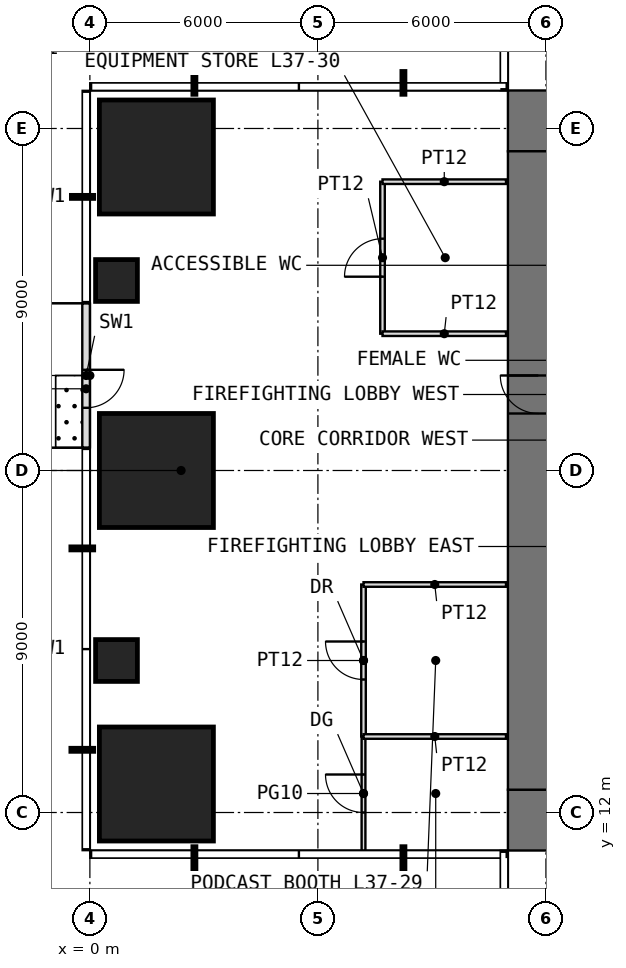
"""IFC4 building model, lengths in metres.
Left out: names, types, materials, properties, quantities, classifications, styles, units other than length and angle.
Written with IfcOpenShell. Run it as: python <this file> out.ifc"""

import sys

from ifc_helpers import new_model, si_unit, direction, frame, frame_2d, origin, origin_2d, place, context, subcontext, project, spatial, rectangle, extrude, element, fill, save


model = new_model("IFC4")
c1 = context("Model", 3, precision=1e-05, world=origin(), true_north=direction((0.0, 1.0)))
c2 = subcontext(c1, "Body", "Model", "MODEL_VIEW")
j1 = project(units=[si_unit("LENGTHUNIT", "METRE"), si_unit("PLANEANGLEUNIT", "RADIAN")], contexts=[c1])
p1 = place(None, origin())
s1 = spatial("IfcSite", under=j1, at=p1, CompositionType="ELEMENT")
p2 = place(p1, origin())
s2 = spatial("IfcBuilding", under=s1, at=p2, CompositionType="ELEMENT")
p3 = place(p2, frame((0.0, 0.0, 156.5)))
s3 = spatial("IfcBuildingStorey", under=s2, at=p3, CompositionType="ELEMENT", Elevation=156.5)
p4 = place(p3, frame((1.75, 12.75, 0.0), z_axis=(0.0, 0.0, 1.0), x_axis=(1.0, 0.0, 0.0)))
e1 = element("IfcColumn", 1, at=p4, inside=s3, PredefinedType="COLUMN", context=c2, shape_type="SweptSolid", body=[
    extrude(rectangle(XDim=3.0, YDim=3.0, at=origin_2d()), origin(), (0.0, 0.0, 1.0), 4.0),
])
p5 = place(p3, frame((0.7, 16.0, 0.0), z_axis=(0.0, 0.0, 1.0), x_axis=(1.0, 0.0, 0.0)))
e2 = element("IfcColumn", 2, at=p5, inside=s3, PredefinedType="COLUMN", context=c2, shape_type="SweptSolid", body=[
    extrude(rectangle(XDim=1.1, YDim=1.1, at=origin_2d()), origin(), (0.0, 0.0, 1.0), 4.0),
])
p6 = place(p3, frame((1.75, 21.0, 0.0), z_axis=(0.0, 0.0, 1.0), x_axis=(1.0, 0.0, 0.0)))
e3 = element("IfcColumn", 3, at=p6, inside=s3, PredefinedType="COLUMN", context=c2, shape_type="SweptSolid", body=[
    extrude(rectangle(XDim=3.0, YDim=3.0, at=origin_2d()), origin(), (0.0, 0.0, 1.0), 4.0),
])
p7 = place(p3, frame((0.7, 26.0, 0.0), z_axis=(0.0, 0.0, 1.0), x_axis=(1.0, 0.0, 0.0)))
e4 = element("IfcColumn", 4, at=p7, inside=s3, PredefinedType="COLUMN", context=c2, shape_type="SweptSolid", body=[
    extrude(rectangle(XDim=1.1, YDim=1.1, at=origin_2d()), origin(), (0.0, 0.0, 1.0), 4.0),
])
p8 = place(p3, frame((1.75, 29.25, 0.0), z_axis=(0.0, 0.0, 1.0), x_axis=(1.0, 0.0, 0.0)))
e5 = element("IfcColumn", 5, at=p8, inside=s3, PredefinedType="COLUMN", context=c2, shape_type="SweptSolid", body=[
    extrude(rectangle(XDim=3.0, YDim=3.0, at=origin_2d()), origin(), (0.0, 0.0, 1.0), 4.0),
])
p9 = place(p3, frame((-0.1, 25.4, 0.0), z_axis=(0.0, 0.0, 1.0), x_axis=(0.0, -1.0, 0.0)))
e6 = element("IfcWall", 6, at=p9, inside=s3, PredefinedType="USERDEFINED", context=c2, shape_type="SweptSolid", body=[
    extrude(rectangle(XDim=3.8, YDim=0.2, at=frame_2d((1.9, 0.0))), origin(), (0.0, 0.0, 1.0), 3.55),
])
p10 = place(p9, frame((1.75, 0.0, 0.0)))
e7 = element("IfcOpeningElement", 7, at=p10, cuts=e6, PredefinedType="OPENING", context=c2, shape_type="SweptSolid", body=[
    extrude(rectangle(XDim=1.0, YDim=2.4, at=frame_2d((0.5, 1.2))), frame((0.0, 0.11, 0.0), z_axis=(0.0, -1.0, 0.0), x_axis=(1.0, 0.0, 0.0)), (0.0, 0.0, 1.0), 0.22),
])
p11 = place(p3, frame((11.0, 11.8, -0.05), z_axis=(0.0, 0.0, 1.0), x_axis=(1.0, 0.0, 0.0)))
e8 = element("IfcWall", 8, at=p11, inside=s3, PredefinedType="SHEAR", context=c2, shape_type="SweptSolid", body=[
    extrude(rectangle(XDim=20.0, YDim=1.6, at=frame_2d((10.0, 0.0))), origin(), (0.0, 0.0, 1.0), 3.8),
])
p12 = place(p11, frame((9.0, 0.0, 0.05)))
e9 = element("IfcOpeningElement", 9, at=p12, cuts=e8, PredefinedType="OPENING", context=c2, shape_type="SweptSolid", body=[
    extrude(rectangle(XDim=2.0, YDim=2.2, at=frame_2d((1.0, 1.1))), frame((0.0, 0.81, 0.0), z_axis=(0.0, -1.0, 0.0), x_axis=(1.0, 0.0, 0.0)), (0.0, 0.0, 1.0), 1.62),
])
p13 = place(p3, frame((11.0, 30.2, -0.05), z_axis=(0.0, 0.0, 1.0), x_axis=(1.0, 0.0, 0.0)))
e10 = element("IfcWall", 10, at=p13, inside=s3, PredefinedType="SHEAR", context=c2, shape_type="SweptSolid", body=[
    extrude(rectangle(XDim=20.0, YDim=1.6, at=frame_2d((10.0, 0.0))), origin(), (0.0, 0.0, 1.0), 3.8),
])
p14 = place(p13, frame((9.0, 0.0, 0.05)))
e11 = element("IfcOpeningElement", 11, at=p14, cuts=e10, PredefinedType="OPENING", context=c2, shape_type="SweptSolid", body=[
    extrude(rectangle(XDim=2.0, YDim=2.2, at=frame_2d((1.0, 1.1))), frame((0.0, 0.81, 0.0), z_axis=(0.0, -1.0, 0.0), x_axis=(1.0, 0.0, 0.0)), (0.0, 0.0, 1.0), 1.62),
])
p15 = place(p3, frame((11.8, 12.6, -0.05), z_axis=(0.0, 0.0, 1.0), x_axis=(0.0, 1.0, 0.0)))
e12 = element("IfcWall", 12, at=p15, inside=s3, PredefinedType="SHEAR", context=c2, shape_type="SweptSolid", body=[
    extrude(rectangle(XDim=16.8, YDim=1.6, at=frame_2d((8.4, 0.0))), origin(), (0.0, 0.0, 1.0), 3.8),
])
p16 = place(p15, frame((9.9, 0.0, 0.05)))
e13 = element("IfcOpeningElement", 13, at=p16, cuts=e12, PredefinedType="OPENING", context=c2, shape_type="SweptSolid", body=[
    extrude(rectangle(XDim=1.0, YDim=2.2, at=frame_2d((0.5, 1.1))), frame((0.0, 0.81, 0.0), z_axis=(0.0, -1.0, 0.0), x_axis=(1.0, 0.0, 0.0)), (0.0, 0.0, 1.0), 1.62),
])
p17 = place(p3, frame((7.2, 11.0, 0.0), z_axis=(0.0, 0.0, 1.0), x_axis=(0.0, 1.0, 0.0)))
e14 = element("IfcWall", 14, at=p17, inside=s3, PredefinedType="PARTITIONING", context=c2, shape_type="SweptSolid", body=[
    extrude(rectangle(XDim=3.0, YDim=0.1, at=frame_2d((1.5, 0.0))), origin(), (0.0, 0.0, 1.0), 3.55),
])
p18 = place(p17, frame((1.0, 0.0, 0.0)))
e15 = element("IfcOpeningElement", 15, at=p18, cuts=e14, PredefinedType="OPENING", context=c2, shape_type="SweptSolid", body=[
    extrude(rectangle(XDim=1.0, YDim=2.4, at=frame_2d((0.5, 1.2))), frame((0.0, 0.06, 0.0), z_axis=(0.0, -1.0, 0.0), x_axis=(1.0, 0.0, 0.0)), (0.0, 0.0, 1.0), 0.12),
])
p19 = place(p3, frame((7.2, 14.0, 0.0), z_axis=(0.0, 0.0, 1.0), x_axis=(0.0, 1.0, 0.0)))
e16 = element("IfcWall", 16, at=p19, inside=s3, PredefinedType="PARTITIONING", context=c2, shape_type="SweptSolid", body=[
    extrude(rectangle(XDim=4.0, YDim=0.12, at=frame_2d((2.0, 0.0))), origin(), (0.0, 0.0, 1.0), 3.55),
])
p20 = place(p19, frame((1.5, 0.0, 0.0)))
e17 = element("IfcOpeningElement", 17, at=p20, cuts=e16, PredefinedType="OPENING", context=c2, shape_type="SweptSolid", body=[
    extrude(rectangle(XDim=1.0, YDim=2.2, at=frame_2d((0.5, 1.1))), frame((0.0, 0.07, 0.0), z_axis=(0.0, -1.0, 0.0), x_axis=(1.0, 0.0, 0.0)), (0.0, 0.0, 1.0), 0.14),
])
for number, where, z_axis, x_axis in (
    (18, (7.2, 14.0, 0.0), (0.0, 0.0, 1.0), (1.0, 0.0, 0.0)),
    (19, (7.2, 18.0, 0.0), (0.0, 0.0, 1.0), (1.0, 0.0, 0.0)),
):
    element("IfcWall", number, at=place(p3, frame(where, z_axis=z_axis, x_axis=x_axis)), inside=s3, PredefinedType="PARTITIONING", context=c2, shape_type="SweptSolid", body=[
        extrude(rectangle(XDim=3.75, YDim=0.12, at=frame_2d((1.875, 0.0))), origin(), (0.0, 0.0, 1.0), 3.55),
    ])
p21 = place(p3, frame((7.7, 24.6, 0.0), z_axis=(0.0, 0.0, 1.0), x_axis=(0.0, 1.0, 0.0)))
e20 = element("IfcWall", 20, at=p21, inside=s3, PredefinedType="PARTITIONING", context=c2, shape_type="SweptSolid", body=[
    extrude(rectangle(XDim=4.0, YDim=0.12, at=frame_2d((2.0, 0.0))), origin(), (0.0, 0.0, 1.0), 3.55),
])
p22 = place(p21, frame((1.5, 0.0, 0.0)))
e21 = element("IfcOpeningElement", 21, at=p22, cuts=e20, PredefinedType="OPENING", context=c2, shape_type="SweptSolid", body=[
    extrude(rectangle(XDim=1.0, YDim=2.2, at=frame_2d((0.5, 1.1))), frame((0.0, 0.07, 0.0), z_axis=(0.0, -1.0, 0.0), x_axis=(1.0, 0.0, 0.0)), (0.0, 0.0, 1.0), 0.14),
])
for number, where, z_axis, x_axis in (
    (22, (7.7, 24.6, 0.0), (0.0, 0.0, 1.0), (1.0, 0.0, 0.0)),
    (23, (7.7, 28.6, 0.0), (0.0, 0.0, 1.0), (1.0, 0.0, 0.0)),
):
    element("IfcWall", number, at=place(p3, frame(where, z_axis=z_axis, x_axis=x_axis)), inside=s3, PredefinedType="PARTITIONING", context=c2, shape_type="SweptSolid", body=[
        extrude(rectangle(XDim=3.25, YDim=0.12, at=frame_2d((1.625, 0.0))), origin(), (0.0, 0.0, 1.0), 3.55),
    ])
p23 = place(p10, origin())
e24 = element("IfcDoor", 24, at=p23, inside=s3, OperationType="SINGLE_SWING_LEFT", PredefinedType="DOOR", context=c2, shape_type="SweptSolid", body=[
    extrude(rectangle(XDim=1.0, YDim=2.4, at=frame_2d((0.5, 1.2))), frame((0.0, 0.025, 0.0), z_axis=(0.0, -1.0, 0.0), x_axis=(1.0, 0.0, 0.0)), (0.0, 0.0, 1.0), 0.05),
])
fill(e7, e24)
p24 = place(p16, origin())
e25 = element("IfcDoor", 25, at=p24, inside=s3, OperationType="SINGLE_SWING_RIGHT", PredefinedType="DOOR", context=c2, shape_type="SweptSolid", body=[
    extrude(rectangle(XDim=1.0, YDim=2.2, at=frame_2d((0.5, 1.1))), frame((0.0, 0.025, 0.0), z_axis=(0.0, -1.0, 0.0), x_axis=(1.0, 0.0, 0.0)), (0.0, 0.0, 1.0), 0.05),
])
fill(e13, e25)
p25 = place(p18, origin())
e26 = element("IfcDoor", 26, at=p25, inside=s3, OperationType="SINGLE_SWING_RIGHT", PredefinedType="DOOR", context=c2, shape_type="SweptSolid", body=[
    extrude(rectangle(XDim=1.0, YDim=2.4, at=frame_2d((0.5, 1.2))), frame((0.0, 0.025, 0.0), z_axis=(0.0, -1.0, 0.0), x_axis=(1.0, 0.0, 0.0)), (0.0, 0.0, 1.0), 0.05),
])
fill(e15, e26)
p26 = place(p20, origin())
e27 = element("IfcDoor", 27, at=p26, inside=s3, OperationType="SINGLE_SWING_RIGHT", PredefinedType="DOOR", context=c2, shape_type="SweptSolid", body=[
    extrude(rectangle(XDim=1.0, YDim=2.2, at=frame_2d((0.5, 1.1))), frame((0.0, 0.025, 0.0), z_axis=(0.0, -1.0, 0.0), x_axis=(1.0, 0.0, 0.0)), (0.0, 0.0, 1.0), 0.05),
])
fill(e17, e27)
p27 = place(p22, origin())
e28 = element("IfcDoor", 28, at=p27, inside=s3, OperationType="SINGLE_SWING_LEFT", PredefinedType="DOOR", context=c2, shape_type="SweptSolid", body=[
    extrude(rectangle(XDim=1.0, YDim=2.2, at=frame_2d((0.5, 1.1))), frame((0.0, 0.025, 0.0), z_axis=(0.0, -1.0, 0.0), x_axis=(1.0, 0.0, 0.0)), (0.0, 0.0, 1.0), 0.05),
])
fill(e21, e28)
save(model, sys.argv[1])
